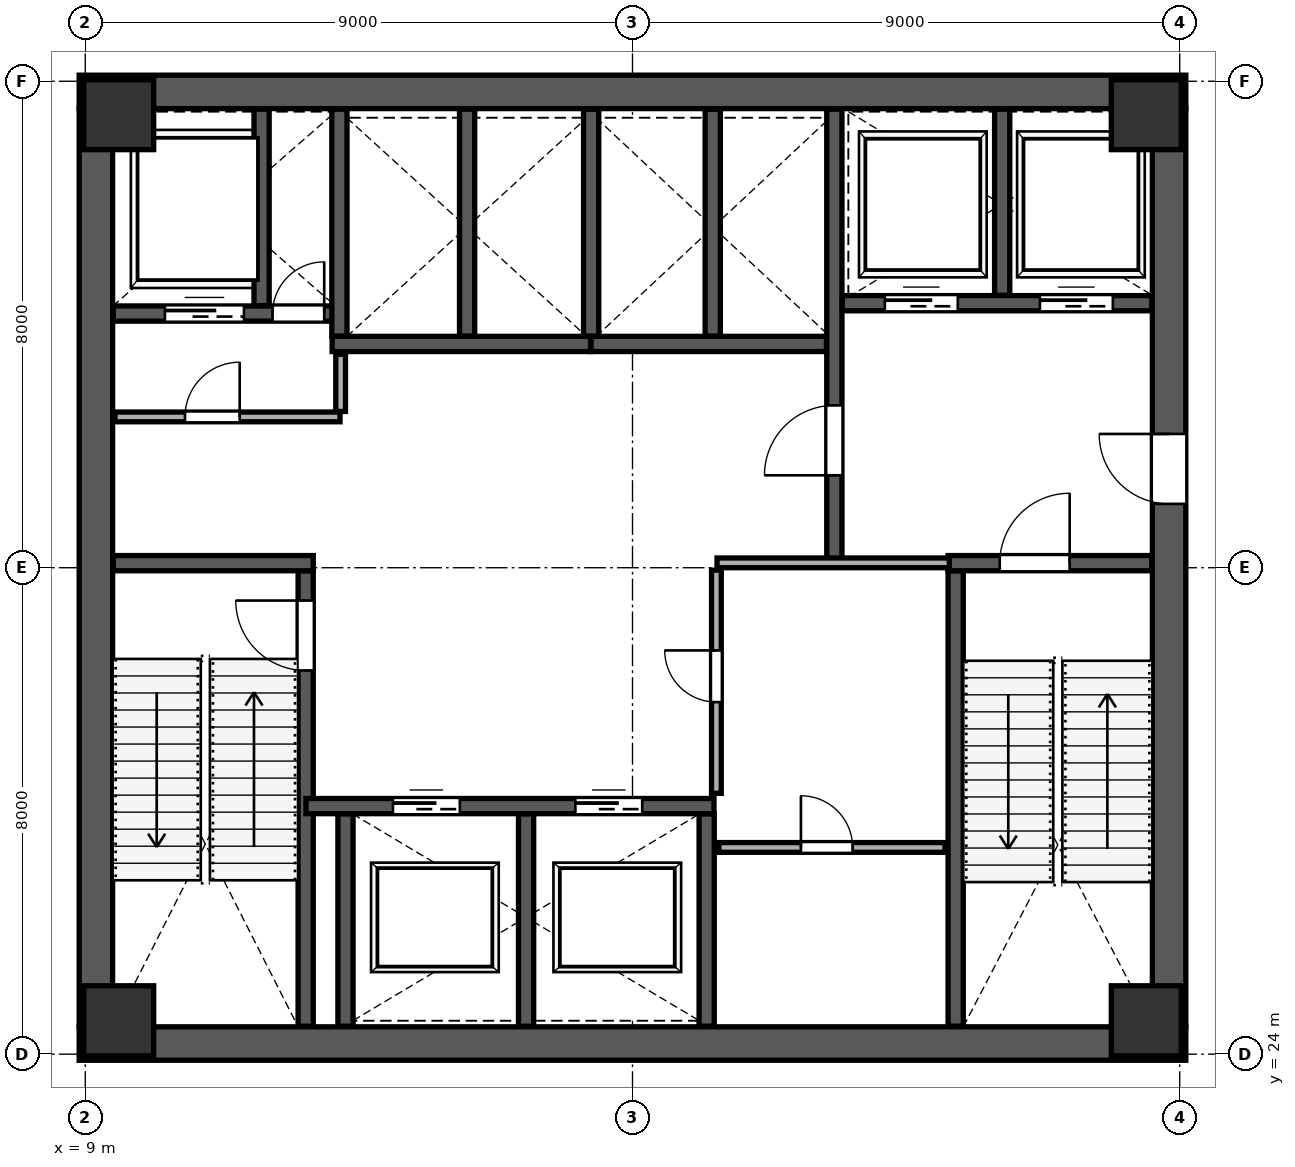
"""IFC4 building model, lengths in metres.
Left out: names, types, materials, properties, quantities, classifications, styles, units other than length and angle.
Written with IfcOpenShell. Run it as: python <this file> out.ifc"""

import sys

from ifc_helpers import new_model, si_unit, direction, frame, frame_2d, origin, origin_2d, place, context, subcontext, project, spatial, rectangle, extrude, source, transform, mapped, element, fill, save


model = new_model("IFC4")
c1 = context("Model", 3, precision=1e-05, world=origin(), true_north=direction((0.0, 1.0)))
c2 = subcontext(c1, "Body", "Model", "MODEL_VIEW")
j1 = project(units=[si_unit("LENGTHUNIT", "METRE"), si_unit("PLANEANGLEUNIT", "RADIAN")], contexts=[c1])
p1 = place(None, origin())
s1 = spatial("IfcSite", under=j1, at=p1, CompositionType="ELEMENT")
p2 = place(p1, origin())
s2 = spatial("IfcBuilding", under=s1, at=p2, CompositionType="ELEMENT")
p3 = place(p2, frame((0.0, 0.0, 47.2)))
s3 = spatial("IfcBuildingStorey", under=s2, at=p3, CompositionType="ELEMENT", Elevation=47.2)
m1 = source(origin(), c2, "Body", "SweptSolid", [
    extrude(rectangle(XDim=1.15, YDim=1.15, at=origin_2d()), origin(), (0.0, 0.0, 1.0), 4.799),
])
for number, where, z_axis, x_axis in (
    (1, (9.55, 24.55, 0.001), (0.0, 0.0, 1.0), (1.0, 0.0, 0.0)),
    (2, (26.45, 24.55, 0.001), (0.0, 0.0, 1.0), (1.0, 0.0, 0.0)),
    (3, (9.55, 39.45, 0.001), (0.0, 0.0, 1.0), (1.0, 0.0, 0.0)),
    (4, (26.45, 39.45, 0.001), (0.0, 0.0, 1.0), (1.0, 0.0, 0.0)),
):
    element("IfcColumn", number, at=place(p3, frame(where, z_axis=z_axis, x_axis=x_axis)), inside=s3, PredefinedType="COLUMN", context=c2, shape_type="MappedRepresentation", body=[
        mapped(m1, transform((0.0, 0.0, 0.0), scale=1.0)),
    ])
p4 = place(p3, frame((9.175, 24.45, 0.0), z_axis=(0.0, 0.0, 1.0), x_axis=(0.0, 1.0, 0.0)))
e5 = element("IfcWall", 5, at=p4, inside=s3, PredefinedType="SHEAR", context=c2, shape_type="SweptSolid", body=[
    extrude(rectangle(XDim=15.1, YDim=0.55, at=frame_2d((7.55, 0.0))), origin(), (0.0, 0.0, 1.0), 4.56),
])
p5 = place(p3, frame((26.825, 24.45, 0.0), z_axis=(0.0, 0.0, 1.0), x_axis=(0.0, 1.0, 0.0)))
e6 = element("IfcWall", 6, at=p5, inside=s3, PredefinedType="SHEAR", context=c2, shape_type="SweptSolid", body=[
    extrude(rectangle(XDim=15.1, YDim=0.55, at=frame_2d((7.55, 0.0))), origin(), (0.0, 0.0, 1.0), 4.56),
])
p6 = place(p5, frame((8.6, 0.0, 0.0)))
e7 = element("IfcOpeningElement", 7, at=p6, cuts=e6, PredefinedType="OPENING", context=c2, shape_type="SweptSolid", body=[
    extrude(rectangle(XDim=1.15, YDim=2.2, at=frame_2d((0.575, 1.1))), frame((0.0, 0.285, 0.0), z_axis=(0.0, -1.0, 0.0), x_axis=(1.0, 0.0, 0.0)), (0.0, 0.0, 1.0), 0.57),
])
for number, where, z_axis, x_axis in (
    (8, (8.9, 24.175, 0.0), (0.0, 0.0, 1.0), (1.0, 0.0, 0.0)),
    (9, (8.9, 39.825, 0.0), (0.0, 0.0, 1.0), (1.0, 0.0, 0.0)),
):
    element("IfcWall", number, at=place(p3, frame(where, z_axis=z_axis, x_axis=x_axis)), inside=s3, PredefinedType="SHEAR", context=c2, shape_type="SweptSolid", body=[
        extrude(rectangle(XDim=18.2, YDim=0.55, at=frame_2d((9.1, 0.0))), origin(), (0.0, 0.0, 1.0), 4.56),
    ])
p7 = place(p3, frame((12.625, 24.46, 0.0), z_axis=(0.0, 0.0, 1.0), x_axis=(0.0, 1.0, 0.0)))
e10 = element("IfcWall", 10, at=p7, inside=s3, PredefinedType="SHEAR", context=c2, shape_type="SweptSolid", body=[
    extrude(rectangle(XDim=7.49, YDim=0.25, at=frame_2d((3.745, 0.0))), origin(), (0.0, 0.0, 1.0), 4.56),
])
p8 = place(p7, frame((5.85, 0.0, 0.0)))
e11 = element("IfcOpeningElement", 11, at=p8, cuts=e10, PredefinedType="OPENING", context=c2, shape_type="SweptSolid", body=[
    extrude(rectangle(XDim=1.15, YDim=2.2, at=frame_2d((0.575, 1.1))), frame((0.0, 0.135, 0.0), z_axis=(0.0, -1.0, 0.0), x_axis=(1.0, 0.0, 0.0)), (0.0, 0.0, 1.0), 0.27),
])
p9 = place(p3, frame((9.46, 32.075, 0.0), z_axis=(0.0, 0.0, 1.0), x_axis=(1.0, 0.0, 0.0)))
e12 = element("IfcWall", 12, at=p9, inside=s3, PredefinedType="SHEAR", context=c2, shape_type="SweptSolid", body=[
    extrude(rectangle(XDim=3.29, YDim=0.25, at=frame_2d((1.645, 0.0))), origin(), (0.0, 0.0, 1.0), 4.56),
])
p10 = place(p3, frame((23.315, 24.46, 0.0), z_axis=(0.0, 0.0, 1.0), x_axis=(0.0, 1.0, 0.0)))
e13 = element("IfcWall", 13, at=p10, inside=s3, PredefinedType="SHEAR", context=c2, shape_type="SweptSolid", body=[
    extrude(rectangle(XDim=7.49, YDim=0.25, at=frame_2d((3.745, 0.0))), origin(), (0.0, 0.0, 1.0), 4.56),
])
p11 = place(p3, frame((23.19, 32.075, 0.0), z_axis=(0.0, 0.0, 1.0), x_axis=(1.0, 0.0, 0.0)))
e14 = element("IfcWall", 14, at=p11, inside=s3, PredefinedType="SHEAR", context=c2, shape_type="SweptSolid", body=[
    extrude(rectangle(XDim=3.35, YDim=0.25, at=frame_2d((1.675, 0.0))), origin(), (0.0, 0.0, 1.0), 4.56),
])
p12 = place(p11, frame((0.85, 0.0, 0.0)))
e15 = element("IfcOpeningElement", 15, at=p12, cuts=e14, PredefinedType="OPENING", context=c2, shape_type="SweptSolid", body=[
    extrude(rectangle(XDim=1.15, YDim=2.2, at=frame_2d((0.575, 1.1))), frame((0.0, 0.135, 0.0), z_axis=(0.0, -1.0, 0.0), x_axis=(1.0, 0.0, 0.0)), (0.0, 0.0, 1.0), 0.27),
])
p13 = place(p3, frame((21.32, 32.12, 0.0), z_axis=(0.0, 0.0, 1.0), x_axis=(0.0, 1.0, 0.0)))
e16 = element("IfcWall", 16, at=p13, inside=s3, PredefinedType="SHEAR", context=c2, shape_type="SweptSolid", body=[
    extrude(rectangle(XDim=7.42, YDim=0.25, at=frame_2d((3.71, 0.0))), origin(), (0.0, 0.0, 1.0), 4.56),
])
p14 = place(p13, frame((1.4, 0.0, 0.0)))
e17 = element("IfcOpeningElement", 17, at=p14, cuts=e16, PredefinedType="OPENING", context=c2, shape_type="SweptSolid", body=[
    extrude(rectangle(XDim=1.15, YDim=2.2, at=frame_2d((0.575, 1.1))), frame((0.0, 0.135, 0.0), z_axis=(0.0, -1.0, 0.0), x_axis=(1.0, 0.0, 0.0)), (0.0, 0.0, 1.0), 0.27),
])
p15 = place(p3, frame((9.46, 36.18, 0.0), z_axis=(0.0, 0.0, 1.0), x_axis=(1.0, 0.0, 0.0)))
e18 = element("IfcWall", 18, at=p15, inside=s3, PredefinedType="SHEAR", context=c2, shape_type="SweptSolid", body=[
    extrude(rectangle(XDim=3.79, YDim=0.25, at=frame_2d((1.895, 0.0))), origin(), (0.0, 0.0, 1.0), 4.56),
])
p16 = place(p15, frame((2.62, 0.0, 0.0)))
e19 = element("IfcOpeningElement", 19, at=p16, cuts=e18, PredefinedType="OPENING", context=c2, shape_type="SweptSolid", body=[
    extrude(rectangle(XDim=0.85, YDim=2.1, at=frame_2d((0.425, 1.05))), frame((0.0, 0.135, 0.0), z_axis=(0.0, -1.0, 0.0), x_axis=(1.0, 0.0, 0.0)), (0.0, 0.0, 1.0), 0.27),
])
p17 = place(p15, frame((0.85, 0.0, 0.0)))
e20 = element("IfcOpeningElement", 20, at=p17, cuts=e18, PredefinedType="OPENING", context=c2, shape_type="SweptSolid", body=[
    extrude(rectangle(XDim=1.3, YDim=2.25, at=frame_2d((0.65, 1.125))), frame((0.0, 0.135, 0.0), z_axis=(0.0, -1.0, 0.0), x_axis=(1.0, 0.0, 0.0)), (0.0, 0.0, 1.0), 0.27),
])
p18 = place(p3, frame((11.9, 36.31, 0.0), z_axis=(0.0, 0.0, 1.0), x_axis=(0.0, 1.0, 0.0)))
e21 = element("IfcWall", 21, at=p18, inside=s3, PredefinedType="SHEAR", context=c2, shape_type="SweptSolid", body=[
    extrude(rectangle(XDim=3.23, YDim=0.25, at=frame_2d((1.615, 0.0))), origin(), (0.0, 0.0, 1.0), 4.56),
])
p19 = place(p3, frame((21.45, 36.35, 0.0), z_axis=(0.0, 0.0, 1.0), x_axis=(1.0, 0.0, 0.0)))
e22 = element("IfcWall", 22, at=p19, inside=s3, PredefinedType="SHEAR", context=c2, shape_type="SweptSolid", body=[
    extrude(rectangle(XDim=5.09, YDim=0.25, at=frame_2d((2.545, 0.0))), origin(), (0.0, 0.0, 1.0), 4.56),
])
p20 = place(p19, frame((0.7, 0.0, 0.0)))
e23 = element("IfcOpeningElement", 23, at=p20, cuts=e22, PredefinedType="OPENING", context=c2, shape_type="SweptSolid", body=[
    extrude(rectangle(XDim=1.2, YDim=2.2, at=frame_2d((0.6, 1.1))), frame((0.0, 0.135, 0.0), z_axis=(0.0, -1.0, 0.0), x_axis=(1.0, 0.0, 0.0)), (0.0, 0.0, 1.0), 0.27),
])
p21 = place(p19, frame((3.25, 0.0, 0.0)))
e24 = element("IfcOpeningElement", 24, at=p21, cuts=e22, PredefinedType="OPENING", context=c2, shape_type="SweptSolid", body=[
    extrude(rectangle(XDim=1.2, YDim=2.2, at=frame_2d((0.6, 1.1))), frame((0.0, 0.135, 0.0), z_axis=(0.0, -1.0, 0.0), x_axis=(1.0, 0.0, 0.0)), (0.0, 0.0, 1.0), 0.27),
])
p22 = place(p3, frame((24.08, 36.48, 0.0), z_axis=(0.0, 0.0, 1.0), x_axis=(0.0, 1.0, 0.0)))
e25 = element("IfcWall", 25, at=p22, inside=s3, PredefinedType="SHEAR", context=c2, shape_type="SweptSolid", body=[
    extrude(rectangle(XDim=3.06, YDim=0.25, at=frame_2d((1.53, 0.0))), origin(), (0.0, 0.0, 1.0), 4.56),
])
p23 = place(p3, frame((12.63, 28.08, 0.0), z_axis=(0.0, 0.0, 1.0), x_axis=(1.0, 0.0, 0.0)))
e26 = element("IfcWall", 26, at=p23, inside=s3, PredefinedType="SHEAR", context=c2, shape_type="SweptSolid", body=[
    extrude(rectangle(XDim=6.71, YDim=0.25, at=frame_2d((3.355, 0.0))), origin(), (0.0, 0.0, 1.0), 4.56),
])
p24 = place(p23, frame((1.43, 0.0, 0.0)))
e27 = element("IfcOpeningElement", 27, at=p24, cuts=e26, PredefinedType="OPENING", context=c2, shape_type="SweptSolid", body=[
    extrude(rectangle(XDim=1.1, YDim=2.2, at=frame_2d((0.55, 1.1))), frame((0.0, 0.135, 0.0), z_axis=(0.0, -1.0, 0.0), x_axis=(1.0, 0.0, 0.0)), (0.0, 0.0, 1.0), 0.27),
])
p25 = place(p23, frame((4.43, 0.0, 0.0)))
e28 = element("IfcOpeningElement", 28, at=p25, cuts=e26, PredefinedType="OPENING", context=c2, shape_type="SweptSolid", body=[
    extrude(rectangle(XDim=1.1, YDim=2.2, at=frame_2d((0.55, 1.1))), frame((0.0, 0.135, 0.0), z_axis=(0.0, -1.0, 0.0), x_axis=(1.0, 0.0, 0.0)), (0.0, 0.0, 1.0), 0.27),
])
for number, where, z_axis, x_axis in (
    (29, (13.28, 24.46, 0.0), (0.0, 0.0, 1.0), (0.0, 1.0, 0.0)),
    (30, (16.25, 24.46, 0.0), (0.0, 0.0, 1.0), (0.0, 1.0, 0.0)),
    (31, (19.22, 24.46, 0.0), (0.0, 0.0, 1.0), (0.0, 1.0, 0.0)),
):
    element("IfcWall", number, at=place(p3, frame(where, z_axis=z_axis, x_axis=x_axis)), inside=s3, PredefinedType="SHEAR", context=c2, shape_type="SweptSolid", body=[
        extrude(rectangle(XDim=3.49, YDim=0.25, at=frame_2d((1.745, 0.0))), origin(), (0.0, 0.0, 1.0), 4.56),
    ])
p26 = place(p3, frame((13.06, 35.68, 0.0), z_axis=(0.0, 0.0, 1.0), x_axis=(1.0, 0.0, 0.0)))
e32 = element("IfcWall", 32, at=p26, inside=s3, PredefinedType="SHEAR", context=c2, shape_type="SweptSolid", body=[
    extrude(rectangle(XDim=4.25, YDim=0.25, at=frame_2d((2.125, 0.0))), origin(), (0.0, 0.0, 1.0), 4.56),
])
for number, where, z_axis, x_axis in (
    (33, (13.18, 35.81, 0.0), (0.0, 0.0, 1.0), (0.0, 1.0, 0.0)),
    (34, (15.28, 35.81, 0.0), (0.0, 0.0, 1.0), (0.0, 1.0, 0.0)),
):
    element("IfcWall", number, at=place(p3, frame(where, z_axis=z_axis, x_axis=x_axis)), inside=s3, PredefinedType="SHEAR", context=c2, shape_type="SweptSolid", body=[
        extrude(rectangle(XDim=3.73, YDim=0.25, at=frame_2d((1.865, 0.0))), origin(), (0.0, 0.0, 1.0), 4.56),
    ])
p27 = place(p3, frame((17.32, 35.68, 0.0), z_axis=(0.0, 0.0, 1.0), x_axis=(1.0, 0.0, 0.0)))
e35 = element("IfcWall", 35, at=p27, inside=s3, PredefinedType="SHEAR", context=c2, shape_type="SweptSolid", body=[
    extrude(rectangle(XDim=3.87, YDim=0.25, at=frame_2d((1.935, 0.0))), origin(), (0.0, 0.0, 1.0), 4.56),
])
for number, where, z_axis, x_axis in (
    (36, (17.32, 35.81, 0.0), (0.0, 0.0, 1.0), (0.0, 1.0, 0.0)),
    (37, (19.32, 35.81, 0.0), (0.0, 0.0, 1.0), (0.0, 1.0, 0.0)),
):
    element("IfcWall", number, at=place(p3, frame(where, z_axis=z_axis, x_axis=x_axis)), inside=s3, PredefinedType="SHEAR", context=c2, shape_type="SweptSolid", body=[
        extrude(rectangle(XDim=3.73, YDim=0.25, at=frame_2d((1.865, 0.0))), origin(), (0.0, 0.0, 1.0), 4.56),
    ])
p28 = place(p3, frame((9.49, 34.48, 0.0), z_axis=(0.0, 0.0, 1.0), x_axis=(1.0, 0.0, 0.0)))
e38 = element("IfcWall", 38, at=p28, inside=s3, PredefinedType="PARTITIONING", context=c2, shape_type="SweptSolid", body=[
    extrude(rectangle(XDim=3.7, YDim=0.16, at=frame_2d((1.85, 0.0))), origin(), (0.0, 0.0, 1.0), 4.56),
])
p29 = place(p28, frame((1.15, 0.0, 0.0)))
e39 = element("IfcOpeningElement", 39, at=p29, cuts=e38, PredefinedType="OPENING", context=c2, shape_type="SweptSolid", body=[
    extrude(rectangle(XDim=0.9, YDim=2.15, at=frame_2d((0.45, 1.075))), frame((0.0, 0.09, 0.0), z_axis=(0.0, -1.0, 0.0), x_axis=(1.0, 0.0, 0.0)), (0.0, 0.0, 1.0), 0.18),
])
p30 = place(p3, frame((13.2, 34.57, 0.0), z_axis=(0.0, 0.0, 1.0), x_axis=(0.0, 1.0, 0.0)))
e40 = element("IfcWall", 40, at=p30, inside=s3, PredefinedType="PARTITIONING", context=c2, shape_type="SweptSolid", body=[
    extrude(rectangle(XDim=0.94, YDim=0.16, at=frame_2d((0.47, 0.0))), origin(), (0.0, 0.0, 1.0), 4.56),
])
p31 = place(p3, frame((19.39, 32.08, 0.0), z_axis=(0.0, 0.0, 1.0), x_axis=(1.0, 0.0, 0.0)))
e41 = element("IfcWall", 41, at=p31, inside=s3, PredefinedType="PARTITIONING", context=c2, shape_type="SweptSolid", body=[
    extrude(rectangle(XDim=3.82, YDim=0.16, at=frame_2d((1.91, 0.0))), origin(), (0.0, 0.0, 1.0), 4.56),
])
p32 = place(p3, frame((19.38, 28.29, 0.0), z_axis=(0.0, 0.0, 1.0), x_axis=(0.0, 1.0, 0.0)))
e42 = element("IfcWall", 42, at=p32, inside=s3, PredefinedType="PARTITIONING", context=c2, shape_type="SweptSolid", body=[
    extrude(rectangle(XDim=3.67, YDim=0.16, at=frame_2d((1.835, 0.0))), origin(), (0.0, 0.0, 1.0), 4.56),
])
p33 = place(p32, frame((1.5, 0.0, 0.0)))
e43 = element("IfcOpeningElement", 43, at=p33, cuts=e42, PredefinedType="OPENING", context=c2, shape_type="SweptSolid", body=[
    extrude(rectangle(XDim=0.85, YDim=2.1, at=frame_2d((0.425, 1.05))), frame((0.0, 0.09, 0.0), z_axis=(0.0, -1.0, 0.0), x_axis=(1.0, 0.0, 0.0)), (0.0, 0.0, 1.0), 0.18),
])
p34 = place(p3, frame((19.42, 27.4, 0.0), z_axis=(0.0, 0.0, 1.0), x_axis=(1.0, 0.0, 0.0)))
e44 = element("IfcWall", 44, at=p34, inside=s3, PredefinedType="PARTITIONING", context=c2, shape_type="SweptSolid", body=[
    extrude(rectangle(XDim=3.72, YDim=0.16, at=frame_2d((1.86, 0.0))), origin(), (0.0, 0.0, 1.0), 4.56),
])
p35 = place(p34, frame((1.35, 0.0, 0.0)))
e45 = element("IfcOpeningElement", 45, at=p35, cuts=e44, PredefinedType="OPENING", context=c2, shape_type="SweptSolid", body=[
    extrude(rectangle(XDim=0.85, YDim=2.1, at=frame_2d((0.425, 1.05))), frame((0.0, 0.09, 0.0), z_axis=(0.0, -1.0, 0.0), x_axis=(1.0, 0.0, 0.0)), (0.0, 0.0, 1.0), 0.18),
])
m2 = source(origin(), c2, "Body", "SweptSolid", [
    extrude(rectangle(XDim=1.15, YDim=2.2, at=frame_2d((0.575, 1.1))), frame((0.0, 0.025, 0.0), z_axis=(0.0, -1.0, 0.0), x_axis=(1.0, 0.0, 0.0)), (0.0, 0.0, 1.0), 0.05),
])
p36 = place(p8, origin())
e46 = element("IfcDoor", 46, at=p36, inside=s3, OperationType="SINGLE_SWING_RIGHT", PredefinedType="DOOR", context=c2, shape_type="MappedRepresentation", body=[
    mapped(m2, transform((0.0, 0.0, 0.0), scale=1.0)),
])
fill(e11, e46)
m3 = source(origin(), c2, "Body", "SweptSolid", [
    extrude(rectangle(XDim=1.15, YDim=2.2, at=frame_2d((0.575, 1.1))), frame((0.0, 0.025, 0.0), z_axis=(0.0, -1.0, 0.0), x_axis=(1.0, 0.0, 0.0)), (0.0, 0.0, 1.0), 0.05),
])
p37 = place(p14, origin())
e47 = element("IfcDoor", 47, at=p37, inside=s3, OperationType="SINGLE_SWING_LEFT", PredefinedType="DOOR", context=c2, shape_type="MappedRepresentation", body=[
    mapped(m3, transform((0.0, 0.0, 0.0), scale=1.0)),
])
fill(e17, e47)
p38 = place(p12, origin())
e48 = element("IfcDoor", 48, at=p38, inside=s3, OperationType="SINGLE_SWING_RIGHT", PredefinedType="DOOR", context=c2, shape_type="MappedRepresentation", body=[
    mapped(m2, transform((0.0, 0.0, 0.0), scale=1.0)),
])
fill(e15, e48)
p39 = place(p6, origin())
e49 = element("IfcDoor", 49, at=p39, inside=s3, OperationType="SINGLE_SWING_RIGHT", PredefinedType="DOOR", context=c2, shape_type="MappedRepresentation", body=[
    mapped(m3, transform((0.0, 0.0, 0.0), scale=1.0)),
])
fill(e7, e49)
m4 = source(origin(), c2, "Body", "SweptSolid", [
    extrude(rectangle(XDim=0.85, YDim=2.1, at=frame_2d((0.425, 1.05))), frame((0.0, 0.025, 0.0), z_axis=(0.0, -1.0, 0.0), x_axis=(1.0, 0.0, 0.0)), (0.0, 0.0, 1.0), 0.05),
])
p40 = place(p16, origin())
e50 = element("IfcDoor", 50, at=p40, inside=s3, OperationType="SINGLE_SWING_RIGHT", PredefinedType="DOOR", context=c2, shape_type="MappedRepresentation", body=[
    mapped(m4, transform((0.0, 0.0, 0.0), scale=1.0)),
])
fill(e19, e50)
m5 = source(origin(), c2, "Body", "SweptSolid", [
    extrude(rectangle(XDim=1.1, YDim=2.2, at=frame_2d((0.55, 1.1))), frame((0.0, 0.025, 0.0), z_axis=(0.0, -1.0, 0.0), x_axis=(1.0, 0.0, 0.0)), (0.0, 0.0, 1.0), 0.05),
])
p41 = place(p24, origin())
e51 = element("IfcDoor", 51, at=p41, inside=s3, OperationType="SLIDING_TO_LEFT", PredefinedType="DOOR", context=c2, shape_type="MappedRepresentation", body=[
    mapped(m5, transform((0.0, 0.0, 0.0), scale=1.0)),
])
fill(e27, e51)
p42 = place(p25, origin())
e52 = element("IfcDoor", 52, at=p42, inside=s3, OperationType="SLIDING_TO_RIGHT", PredefinedType="DOOR", context=c2, shape_type="MappedRepresentation", body=[
    mapped(m5, transform((0.0, 0.0, 0.0), scale=1.0)),
])
fill(e28, e52)
m6 = source(origin(), c2, "Body", "SweptSolid", [
    extrude(rectangle(XDim=1.2, YDim=2.2, at=frame_2d((0.6, 1.1))), frame((0.0, 0.025, 0.0), z_axis=(0.0, -1.0, 0.0), x_axis=(1.0, 0.0, 0.0)), (0.0, 0.0, 1.0), 0.05),
])
p43 = place(p20, origin())
e53 = element("IfcDoor", 53, at=p43, inside=s3, OperationType="SLIDING_TO_LEFT", PredefinedType="DOOR", context=c2, shape_type="MappedRepresentation", body=[
    mapped(m6, transform((0.0, 0.0, 0.0), scale=1.0)),
])
fill(e23, e53)
p44 = place(p21, origin())
e54 = element("IfcDoor", 54, at=p44, inside=s3, OperationType="SLIDING_TO_RIGHT", PredefinedType="DOOR", context=c2, shape_type="MappedRepresentation", body=[
    mapped(m6, transform((0.0, 0.0, 0.0), scale=1.0)),
])
fill(e24, e54)
m7 = source(origin(), c2, "Body", "SweptSolid", [
    extrude(rectangle(XDim=1.3, YDim=2.25, at=frame_2d((0.65, 1.125))), frame((0.0, 0.025, 0.0), z_axis=(0.0, -1.0, 0.0), x_axis=(1.0, 0.0, 0.0)), (0.0, 0.0, 1.0), 0.05),
])
p45 = place(p17, origin())
e55 = element("IfcDoor", 55, at=p45, inside=s3, OperationType="SLIDING_TO_LEFT", PredefinedType="DOOR", context=c2, shape_type="MappedRepresentation", body=[
    mapped(m7, transform((0.0, 0.0, 0.0), scale=1.0)),
])
fill(e20, e55)
m8 = source(origin(), c2, "Body", "SweptSolid", [
    extrude(rectangle(XDim=0.9, YDim=2.15, at=frame_2d((0.45, 1.075))), frame((0.0, 0.025, 0.0), z_axis=(0.0, -1.0, 0.0), x_axis=(1.0, 0.0, 0.0)), (0.0, 0.0, 1.0), 0.05),
])
p46 = place(p29, origin())
e56 = element("IfcDoor", 56, at=p46, inside=s3, OperationType="SINGLE_SWING_RIGHT", PredefinedType="DOOR", context=c2, shape_type="MappedRepresentation", body=[
    mapped(m8, transform((0.0, 0.0, 0.0), scale=1.0)),
])
fill(e39, e56)
p47 = place(p35, origin())
e57 = element("IfcDoor", 57, at=p47, inside=s3, OperationType="SINGLE_SWING_LEFT", PredefinedType="DOOR", context=c2, shape_type="MappedRepresentation", body=[
    mapped(m4, transform((0.0, 0.0, 0.0), scale=1.0)),
])
fill(e45, e57)
p48 = place(p33, origin())
e58 = element("IfcDoor", 58, at=p48, inside=s3, OperationType="SINGLE_SWING_RIGHT", PredefinedType="DOOR", context=c2, shape_type="MappedRepresentation", body=[
    mapped(m4, transform((0.0, 0.0, 0.0), scale=1.0)),
])
fill(e43, e58)
save(model, sys.argv[1])
